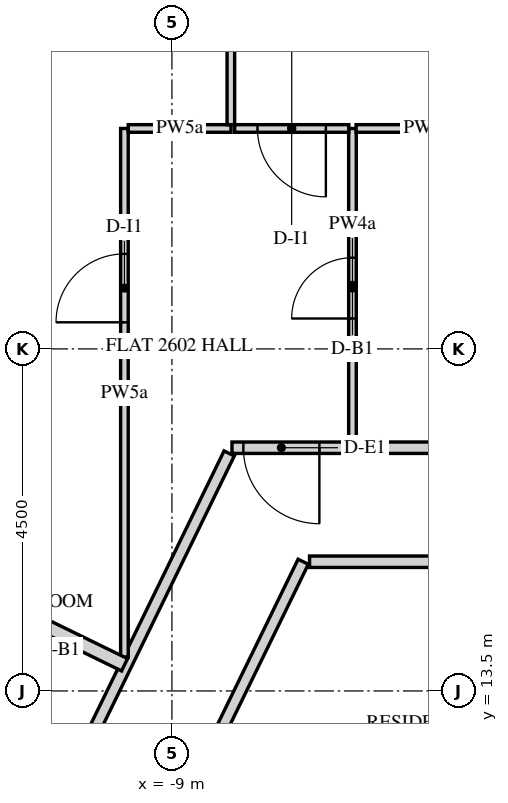
"""IFC4 building model, lengths in metres.
Left out: names, types, materials, properties, quantities, classifications, styles, units other than length and angle.
Written with IfcOpenShell. Run it as: python <this file> out.ifc"""

import sys

from ifc_helpers import new_model, si_unit, direction, frame, frame_2d, origin, place, context, subcontext, project, spatial, rectangle, extrude, element, fill, save


model = new_model("IFC4")
c1 = context("Model", 3, precision=1e-05, world=origin(), true_north=direction((0.0, 1.0)))
c2 = subcontext(c1, "Body", "Model", "MODEL_VIEW")
j1 = project(units=[si_unit("LENGTHUNIT", "METRE"), si_unit("PLANEANGLEUNIT", "RADIAN")], contexts=[c1])
p1 = place(None, origin())
s1 = spatial("IfcSite", under=j1, at=p1, CompositionType="ELEMENT")
p2 = place(p1, origin())
s2 = spatial("IfcBuilding", under=s1, at=p2, CompositionType="ELEMENT")
p3 = place(p2, frame((0.0, 0.0, 334.2)))
s3 = spatial("IfcBuildingStorey", under=s2, at=p3, CompositionType="ELEMENT", Elevation=334.2)
p4 = place(p3, frame((6.392, 16.7, 0.0), z_axis=(0.0, 0.0, 1.0), x_axis=(-1.0, 0.0, 0.0)))
e1 = element("IfcWall", 1, at=p4, inside=s3, PredefinedType="PARTITIONING", context=c2, shape_type="SweptSolid", body=[
    extrude(rectangle(XDim=14.602, YDim=0.15, at=frame_2d((7.301, 0.0))), origin(), (0.0, 0.0, 1.0), 2.838),
])
p5 = place(p4, frame((0.925, 0.0, 0.0)))
e2 = element("IfcOpeningElement", 2, at=p5, cuts=e1, PredefinedType="OPENING", context=c2, shape_type="SweptSolid", body=[
    extrude(rectangle(XDim=1.0, YDim=2.1, at=frame_2d((0.5, 1.05))), frame((0.0, 0.085, 0.0), z_axis=(0.0, -1.0, 0.0), x_axis=(1.0, 0.0, 0.0)), (0.0, 0.0, 1.0), 0.17),
])
p6 = place(p4, frame((13.452, 0.0, 0.0)))
e3 = element("IfcOpeningElement", 3, at=p6, cuts=e1, PredefinedType="OPENING", context=c2, shape_type="SweptSolid", body=[
    extrude(rectangle(XDim=1.0, YDim=2.1, at=frame_2d((0.5, 1.05))), frame((0.0, 0.085, 0.0), z_axis=(0.0, -1.0, 0.0), x_axis=(1.0, 0.0, 0.0)), (0.0, 0.0, 1.0), 0.17),
])
p7 = place(p3, frame((-8.247, 16.625, 0.0), z_axis=(0.0, 0.0, 1.0), x_axis=(-0.438376416131, -0.89879147625, 0.0)))
e4 = element("IfcWall", 4, at=p7, inside=s3, PredefinedType="PARTITIONING", context=c2, shape_type="SweptSolid", body=[
    extrude(rectangle(XDim=16.606, YDim=0.15, at=frame_2d((8.303, 0.0))), origin(), (0.0, 0.0, 1.0), 2.838),
])
p8 = place(p7, frame((6.103, 0.0, 0.0)))
e5 = element("IfcOpeningElement", 5, at=p8, cuts=e4, PredefinedType="OPENING", context=c2, shape_type="SweptSolid", body=[
    extrude(rectangle(XDim=1.0, YDim=2.1, at=frame_2d((0.5, 1.05))), frame((0.0, 0.085, 0.0), z_axis=(0.0, -1.0, 0.0), x_axis=(1.0, 0.0, 0.0)), (0.0, 0.0, 1.0), 0.17),
])
p9 = place(p3, frame((-10.978, 7.604, 0.0), z_axis=(0.0, 0.0, 1.0), x_axis=(0.43838720727, 0.898786212902, 0.0)))
e6 = element("IfcWall", 6, at=p9, inside=s3, PredefinedType="PARTITIONING", context=c2, shape_type="SweptSolid", body=[
    extrude(rectangle(XDim=8.452, YDim=0.15, at=frame_2d((4.226, 0.0))), origin(), (0.0, 0.0, 1.0), 2.838),
])
p10 = place(p3, frame((-7.189, 15.2, 0.0), z_axis=(0.0, 0.0, 1.0), x_axis=(1.0, 0.0, 0.0)))
e7 = element("IfcWall", 7, at=p10, inside=s3, PredefinedType="PARTITIONING", context=c2, shape_type="SweptSolid", body=[
    extrude(rectangle(XDim=12.859, YDim=0.15, at=frame_2d((6.429, 0.0))), origin(), (0.0, 0.0, 1.0), 2.838),
])
p11 = place(p10, frame((5.979, 0.0, 0.0)))
e8 = element("IfcOpeningElement", 8, at=p11, cuts=e7, PredefinedType="OPENING", context=c2, shape_type="SweptSolid", body=[
    extrude(rectangle(XDim=0.9, YDim=2.1, at=frame_2d((0.45, 1.05))), frame((0.0, 0.085, 0.0), z_axis=(0.0, -1.0, 0.0), x_axis=(1.0, 0.0, 0.0)), (0.0, 0.0, 1.0), 0.17),
])
p12 = place(p3, frame((-9.625, 13.945, 0.0), z_axis=(0.0, 0.0, 1.0), x_axis=(0.0, 1.0, 0.0)))
e9 = element("IfcWall", 9, at=p12, inside=s3, PredefinedType="PARTITIONING", context=c2, shape_type="SweptSolid", body=[
    extrude(rectangle(XDim=6.955, YDim=0.1, at=frame_2d((3.477, 0.0))), origin(), (0.0, 0.0, 1.0), 2.838),
])
p13 = place(p12, frame((4.405, 0.0, 0.0)))
e10 = element("IfcOpeningElement", 10, at=p13, cuts=e9, PredefinedType="OPENING", context=c2, shape_type="SweptSolid", body=[
    extrude(rectangle(XDim=0.9, YDim=2.1, at=frame_2d((0.45, 1.05))), frame((0.0, 0.06, 0.0), z_axis=(0.0, -1.0, 0.0), x_axis=(1.0, 0.0, 0.0)), (0.0, 0.0, 1.0), 0.12),
])
p14 = place(p3, frame((-9.575, 20.9, 0.0), z_axis=(0.0, 0.0, 1.0), x_axis=(1.0, 0.0, 0.0)))
e11 = element("IfcWall", 11, at=p14, inside=s3, PredefinedType="PARTITIONING", context=c2, shape_type="SweptSolid", body=[
    extrude(rectangle(XDim=1.352, YDim=0.1, at=frame_2d((0.676, 0.0))), origin(), (0.0, 0.0, 1.0), 2.838),
])
p15 = place(p3, frame((-8.225, 20.95, 0.0), z_axis=(0.0, 0.0, 1.0), x_axis=(0.0, 1.0, 0.0)))
e12 = element("IfcWall", 12, at=p15, inside=s3, PredefinedType="PARTITIONING", context=c2, shape_type="SweptSolid", body=[
    extrude(rectangle(XDim=4.55, YDim=0.1, at=frame_2d((2.275, 0.0))), origin(), (0.0, 0.0, 1.0), 2.838),
])
p16 = place(p3, frame((-17.516, 17.694, 0.0), z_axis=(0.0, 0.0, 1.0), x_axis=(0.898787414812, -0.438384743092, 0.0)))
e13 = element("IfcWall", 13, at=p16, inside=s3, PredefinedType="PARTITIONING", context=c2, shape_type="SweptSolid", body=[
    extrude(rectangle(XDim=8.782, YDim=0.18, at=frame_2d((4.391, 0.0))), origin(), (0.0, 0.0, 1.0), 2.838),
])
p17 = place(p3, frame((-6.625, 16.775, 0.0), z_axis=(0.0, 0.0, 1.0), x_axis=(0.0, 1.0, 0.0)))
e14 = element("IfcWall", 14, at=p17, inside=s3, PredefinedType="PARTITIONING", context=c2, shape_type="SweptSolid", body=[
    extrude(rectangle(XDim=4.125, YDim=0.1, at=frame_2d((2.062, 0.0))), origin(), (0.0, 0.0, 1.0), 2.838),
])
p18 = place(p17, frame((1.625, 0.0, 0.0)))
e15 = element("IfcOpeningElement", 15, at=p18, cuts=e14, PredefinedType="OPENING", context=c2, shape_type="SweptSolid", body=[
    extrude(rectangle(XDim=0.8, YDim=2.1, at=frame_2d((0.4, 1.05))), frame((0.0, 0.06, 0.0), z_axis=(0.0, -1.0, 0.0), x_axis=(1.0, 0.0, 0.0)), (0.0, 0.0, 1.0), 0.12),
])
p19 = place(p3, frame((-6.673, 20.9, 0.0), z_axis=(0.0, 0.0, 1.0), x_axis=(-1.0, 0.0, 0.0)))
e16 = element("IfcWall", 16, at=p19, inside=s3, PredefinedType="PARTITIONING", context=c2, shape_type="SweptSolid", body=[
    extrude(rectangle(XDim=1.502, YDim=0.1, at=frame_2d((0.751, 0.0))), origin(), (0.0, 0.0, 1.0), 2.838),
])
p20 = place(p19, frame((0.302, 0.0, 0.0)))
e17 = element("IfcOpeningElement", 17, at=p20, cuts=e16, PredefinedType="OPENING", context=c2, shape_type="SweptSolid", body=[
    extrude(rectangle(XDim=0.9, YDim=2.1, at=frame_2d((0.45, 1.05))), frame((0.0, 0.06, 0.0), z_axis=(0.0, -1.0, 0.0), x_axis=(1.0, 0.0, 0.0)), (0.0, 0.0, 1.0), 0.12),
])
p21 = place(p3, frame((-4.715, 20.9, 0.0), z_axis=(0.0, 0.0, 1.0), x_axis=(-1.0, 0.0, 0.0)))
e18 = element("IfcWall", 18, at=p21, inside=s3, PredefinedType="PARTITIONING", context=c2, shape_type="SweptSolid", body=[
    extrude(rectangle(XDim=1.862, YDim=0.1, at=frame_2d((0.931, 0.0))), origin(), (0.0, 0.0, 1.0), 2.838),
])
p22 = place(p3, frame((-10.551, 12.072, 0.0), z_axis=(0.0, 0.0, 1.0), x_axis=(-0.898790906006, 0.438377585285, 0.0)))
e19 = element("IfcWall", 19, at=p22, inside=s3, PredefinedType="PARTITIONING", context=c2, shape_type="SweptSolid", body=[
    extrude(rectangle(XDim=2.925, YDim=0.1, at=frame_2d((1.462, 0.0))), origin(), (0.0, 0.0, 1.0), 2.838),
])
p23 = place(p22, frame((1.025, 0.0, 0.0)))
e20 = element("IfcOpeningElement", 20, at=p23, cuts=e19, PredefinedType="OPENING", context=c2, shape_type="SweptSolid", body=[
    extrude(rectangle(XDim=0.8, YDim=2.1, at=frame_2d((0.4, 1.05))), frame((0.0, 0.06, 0.0), z_axis=(0.0, -1.0, 0.0), x_axis=(1.0, 0.0, 0.0)), (0.0, 0.0, 1.0), 0.12),
])
p24 = place(p6, origin())
e21 = element("IfcDoor", 21, at=p24, inside=s3, OperationType="SINGLE_SWING_LEFT", PredefinedType="DOOR", context=c2, shape_type="SweptSolid", body=[
    extrude(rectangle(XDim=1.0, YDim=2.1, at=frame_2d((0.5, 1.05))), frame((0.0, 0.025, 0.0), z_axis=(0.0, -1.0, 0.0), x_axis=(1.0, 0.0, 0.0)), (0.0, 0.0, 1.0), 0.05),
])
fill(e3, e21)
p25 = place(p18, origin())
e22 = element("IfcDoor", 22, at=p25, inside=s3, OperationType="SINGLE_SWING_RIGHT", PredefinedType="DOOR", context=c2, shape_type="SweptSolid", body=[
    extrude(rectangle(XDim=0.8, YDim=2.1, at=frame_2d((0.4, 1.05))), frame((0.0, 0.025, 0.0), z_axis=(0.0, -1.0, 0.0), x_axis=(1.0, 0.0, 0.0)), (0.0, 0.0, 1.0), 0.05),
])
fill(e15, e22)
p26 = place(p13, origin())
e23 = element("IfcDoor", 23, at=p26, inside=s3, OperationType="SINGLE_SWING_LEFT", PredefinedType="DOOR", context=c2, shape_type="SweptSolid", body=[
    extrude(rectangle(XDim=0.9, YDim=2.1, at=frame_2d((0.45, 1.05))), frame((0.0, 0.025, 0.0), z_axis=(0.0, -1.0, 0.0), x_axis=(1.0, 0.0, 0.0)), (0.0, 0.0, 1.0), 0.05),
])
fill(e10, e23)
p27 = place(p20, origin())
e24 = element("IfcDoor", 24, at=p27, inside=s3, OperationType="SINGLE_SWING_RIGHT", PredefinedType="DOOR", context=c2, shape_type="SweptSolid", body=[
    extrude(rectangle(XDim=0.9, YDim=2.1, at=frame_2d((0.45, 1.05))), frame((0.0, 0.025, 0.0), z_axis=(0.0, -1.0, 0.0), x_axis=(1.0, 0.0, 0.0)), (0.0, 0.0, 1.0), 0.05),
])
fill(e17, e24)
save(model, sys.argv[1])
